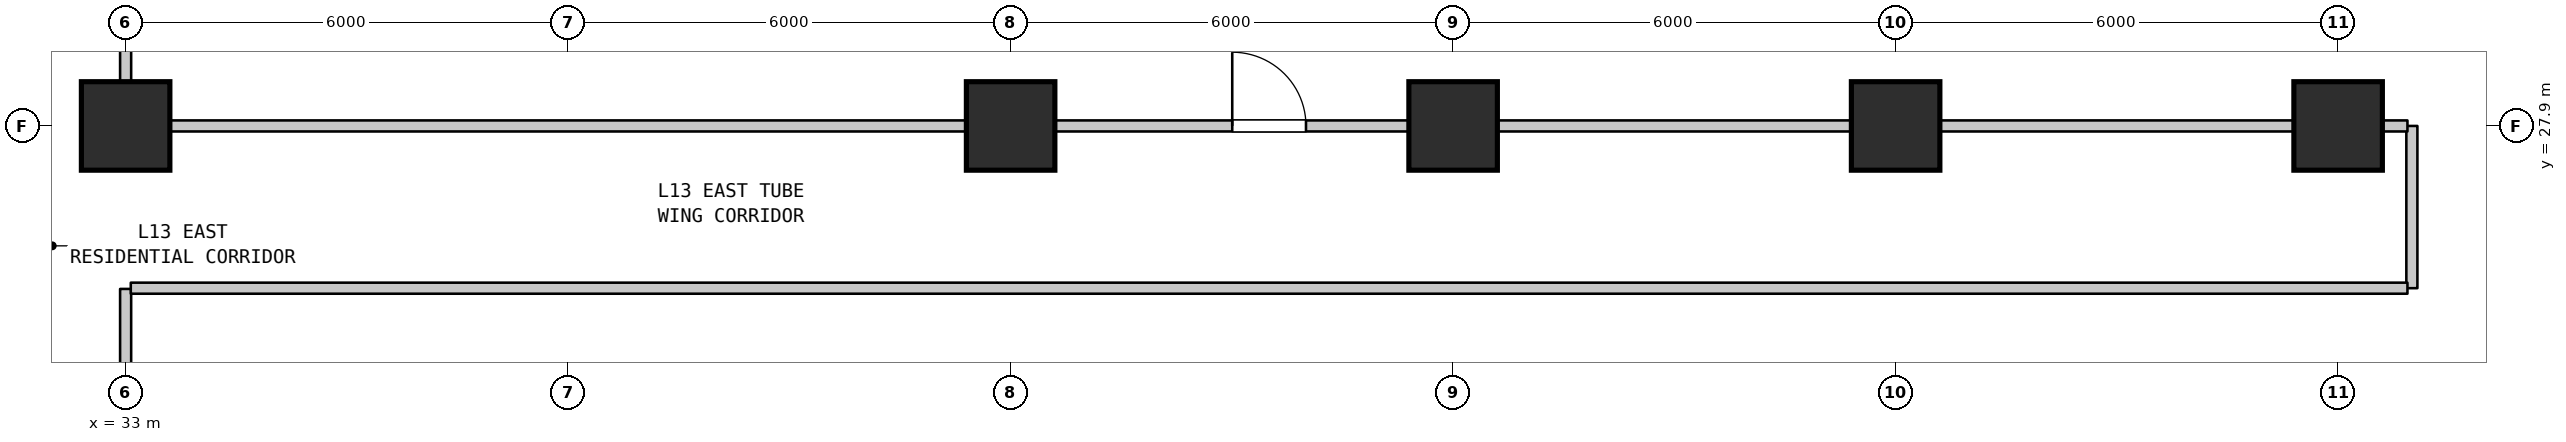
"""IFC4 building model, lengths in metres.
Left out: names, types, materials, properties, quantities, classifications, styles, units other than length and angle.
Written with IfcOpenShell. Run it as: python <this file> out.ifc"""

import sys

from ifc_helpers import new_model, si_unit, direction, frame, frame_2d, origin, origin_2d, place, context, subcontext, project, spatial, rectangle, extrude, element, fill, save


model = new_model("IFC4")
c1 = context("Model", 3, precision=1e-05, world=origin(), true_north=direction((0.0, 1.0)))
c2 = subcontext(c1, "Body", "Model", "MODEL_VIEW")
j1 = project(units=[si_unit("LENGTHUNIT", "METRE"), si_unit("PLANEANGLEUNIT", "RADIAN")], contexts=[c1])
p1 = place(None, origin())
s1 = spatial("IfcSite", under=j1, at=p1, CompositionType="ELEMENT")
p2 = place(p1, origin())
s2 = spatial("IfcBuilding", under=s1, at=p2, CompositionType="ELEMENT")
p3 = place(p2, frame((0.0, 0.0, 57.3)))
s3 = spatial("IfcBuildingStorey", under=s2, at=p3, CompositionType="ELEMENT", Elevation=57.3)
for number, where, z_axis, x_axis in (
    (1, (33.0, 27.9, 0.0), (0.0, 0.0, 1.0), (1.0, 0.0, 0.0)),
    (2, (45.0, 27.9, 0.0), (0.0, 0.0, 1.0), (1.0, 0.0, 0.0)),
    (3, (51.0, 27.9, 0.0), (0.0, 0.0, 1.0), (1.0, 0.0, 0.0)),
    (4, (57.0, 27.9, 0.0), (0.0, 0.0, 1.0), (1.0, 0.0, 0.0)),
    (5, (63.0, 27.9, 0.0), (0.0, 0.0, 1.0), (1.0, 0.0, 0.0)),
):
    element("IfcColumn", number, at=place(p3, frame(where, z_axis=z_axis, x_axis=x_axis)), inside=s3, PredefinedType="COLUMN", context=c2, shape_type="SweptSolid", body=[
        extrude(rectangle(XDim=1.2, YDim=1.2, at=origin_2d()), origin(), (0.0, 0.0, 1.0), 3.7),
    ])
p4 = place(p3, frame((33.0, 19.51, 0.0), z_axis=(0.0, 0.0, 1.0), x_axis=(0.0, 1.0, 0.0)))
e6 = element("IfcWall", 6, at=p4, inside=s3, PredefinedType="STANDARD", context=c2, shape_type="SweptSolid", body=[
    extrude(rectangle(XDim=6.18, YDim=0.15, at=frame_2d((3.09, 0.0))), origin(), (0.0, 0.0, 1.0), 2.78),
])
p5 = place(p3, frame((33.0, 27.91, 0.0), z_axis=(0.0, 0.0, 1.0), x_axis=(0.0, 1.0, 0.0)))
e7 = element("IfcWall", 7, at=p5, inside=s3, PredefinedType="STANDARD", context=c2, shape_type="SweptSolid", body=[
    extrude(rectangle(XDim=9.98, YDim=0.15, at=frame_2d((4.99, 0.0))), origin(), (0.0, 0.0, 1.0), 2.78),
])
p6 = place(p3, frame((64.0, 25.7, 0.0), z_axis=(0.0, 0.0, 1.0), x_axis=(0.0, 1.0, 0.0)))
e8 = element("IfcWall", 8, at=p6, inside=s3, PredefinedType="STANDARD", context=c2, shape_type="SweptSolid", body=[
    extrude(rectangle(XDim=2.2, YDim=0.15, at=frame_2d((1.1, 0.0))), origin(), (0.0, 0.0, 1.0), 3.28),
])
p7 = place(p3, frame((33.07, 25.7, 0.0), z_axis=(0.0, 0.0, 1.0), x_axis=(1.0, 0.0, 0.0)))
e9 = element("IfcWall", 9, at=p7, inside=s3, PredefinedType="STANDARD", context=c2, shape_type="SweptSolid", body=[
    extrude(rectangle(XDim=30.87, YDim=0.15, at=frame_2d((15.435, 0.0))), origin(), (0.0, 0.0, 1.0), 3.28),
])
p8 = place(p3, frame((33.07, 27.9, 0.0), z_axis=(0.0, 0.0, 1.0), x_axis=(1.0, 0.0, 0.0)))
e10 = element("IfcWall", 10, at=p8, inside=s3, PredefinedType="STANDARD", context=c2, shape_type="SweptSolid", body=[
    extrude(rectangle(XDim=30.87, YDim=0.15, at=frame_2d((15.435, 0.0))), origin(), (0.0, 0.0, 1.0), 2.78),
])
p9 = place(p8, frame((14.935, 0.0, 0.0)))
e11 = element("IfcOpeningElement", 11, at=p9, cuts=e10, PredefinedType="OPENING", context=c2, shape_type="SweptSolid", body=[
    extrude(rectangle(XDim=1.0, YDim=2.15, at=frame_2d((0.5, 1.075))), frame((0.0, 0.085, 0.0), z_axis=(0.0, -1.0, 0.0), x_axis=(1.0, 0.0, 0.0)), (0.0, 0.0, 1.0), 0.17),
])
p10 = place(p9, origin())
e12 = element("IfcDoor", 12, at=p10, inside=s3, OperationType="SINGLE_SWING_LEFT", PredefinedType="DOOR", context=c2, shape_type="SweptSolid", body=[
    extrude(rectangle(XDim=1.0, YDim=2.15, at=frame_2d((0.5, 1.075))), frame((0.0, 0.025, 0.0), z_axis=(0.0, -1.0, 0.0), x_axis=(1.0, 0.0, 0.0)), (0.0, 0.0, 1.0), 0.05),
])
fill(e11, e12)
save(model, sys.argv[1])
